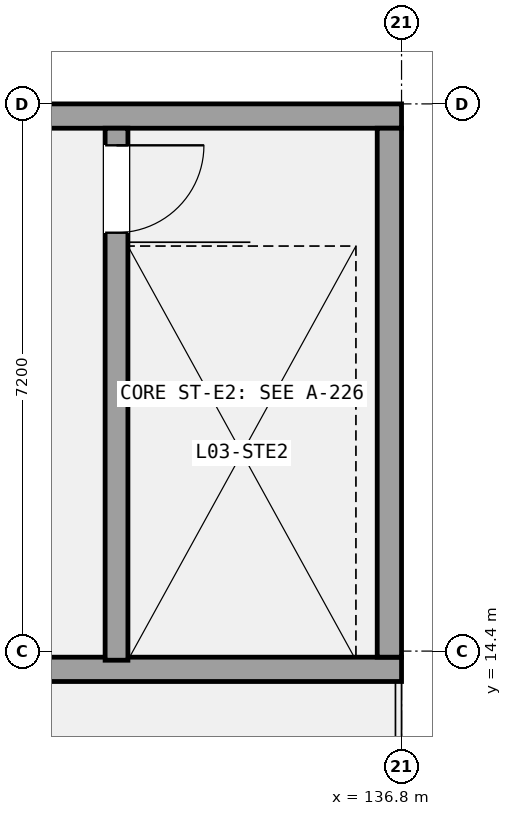
"""IFC4 building model, lengths in metres.
Left out: names, types, materials, properties, quantities, classifications, styles, units other than length and angle.
Written with IfcOpenShell. Run it as: python <this file> out.ifc"""

import sys

from ifc_helpers import new_model, si_unit, direction, frame, frame_2d, origin, place, context, subcontext, project, spatial, rectangle, extrude, element, fill, save


model = new_model("IFC4")
c1 = context("Model", 3, precision=1e-05, world=origin(), true_north=direction((0.0, 1.0)))
c2 = subcontext(c1, "Body", "Model", "MODEL_VIEW")
j1 = project(units=[si_unit("LENGTHUNIT", "METRE"), si_unit("PLANEANGLEUNIT", "RADIAN")], contexts=[c1])
p1 = place(None, origin())
s1 = spatial("IfcSite", under=j1, at=p1, CompositionType="ELEMENT")
p2 = place(p1, origin())
s2 = spatial("IfcBuilding", under=s1, at=p2, CompositionType="ELEMENT")
p3 = place(p2, frame((0.0, 0.0, 12.075)))
s3 = spatial("IfcBuildingStorey", under=s2, at=p3, CompositionType="ELEMENT", Elevation=12.075)
p4 = place(p3, frame((108.0, 14.16, 0.0), z_axis=(0.0, 0.0, 1.0), x_axis=(1.0, 0.0, 0.0)))
e1 = element("IfcWall", 1, at=p4, inside=s3, PredefinedType="SOLIDWALL", context=c2, shape_type="SweptSolid", body=[
    extrude(rectangle(XDim=28.8, YDim=0.32, at=frame_2d((14.4, 0.0))), origin(), (0.0, 0.0, 1.0), 3.15),
])
p5 = place(p4, frame((10.8, 0.0, 0.0)))
e2 = element("IfcOpeningElement", 2, at=p5, cuts=e1, PredefinedType="OPENING", context=c2, shape_type="SweptSolid", body=[
    extrude(rectangle(XDim=1.35, YDim=2.2, at=frame_2d((0.675, 1.1))), frame((0.0, 0.17, 0.0), z_axis=(0.0, -1.0, 0.0), x_axis=(1.0, 0.0, 0.0)), (0.0, 0.0, 1.0), 0.34),
])
p6 = place(p3, frame((108.0, 21.44, 0.0), z_axis=(0.0, 0.0, 1.0), x_axis=(1.0, 0.0, 0.0)))
e3 = element("IfcWall", 3, at=p6, inside=s3, PredefinedType="SOLIDWALL", context=c2, shape_type="SweptSolid", body=[
    extrude(rectangle(XDim=28.8, YDim=0.32, at=frame_2d((14.4, 0.0))), origin(), (0.0, 0.0, 1.0), 3.15),
])
p7 = place(p3, frame((136.64, 14.32, 0.0), z_axis=(0.0, 0.0, 1.0), x_axis=(0.0, 1.0, 0.0)))
e4 = element("IfcWall", 4, at=p7, inside=s3, PredefinedType="SOLIDWALL", context=c2, shape_type="SweptSolid", body=[
    extrude(rectangle(XDim=6.96, YDim=0.32, at=frame_2d((3.48, 0.0))), origin(), (0.0, 0.0, 1.0), 3.15),
])
p8 = place(p3, frame((133.05, 14.28, 0.0), z_axis=(0.0, 0.0, 1.0), x_axis=(0.0, 1.0, 0.0)))
e5 = element("IfcWall", 5, at=p8, inside=s3, PredefinedType="SHEAR", context=c2, shape_type="SweptSolid", body=[
    extrude(rectangle(XDim=7.0, YDim=0.3, at=frame_2d((3.5, 0.0))), origin(), (0.0, 0.0, 1.0), 3.15),
])
p9 = place(p8, frame((5.625, 0.0, 0.0)))
e6 = element("IfcOpeningElement", 6, at=p9, cuts=e5, PredefinedType="OPENING", context=c2, shape_type="SweptSolid", body=[
    extrude(rectangle(XDim=1.15, YDim=2.12, at=frame_2d((0.575, 1.06))), frame((0.0, 0.16, 0.0), z_axis=(0.0, -1.0, 0.0), x_axis=(1.0, 0.0, 0.0)), (0.0, 0.0, 1.0), 0.32),
])
p10 = place(p9, frame((1.15, 0.0, 0.0), z_axis=(0.0, 0.0, 1.0), x_axis=(-1.0, 0.0, 0.0)))
e7 = element("IfcDoor", 7, at=p10, inside=s3, OperationType="SINGLE_SWING_RIGHT", PredefinedType="DOOR", context=c2, shape_type="SweptSolid", body=[
    extrude(rectangle(XDim=1.15, YDim=2.12, at=frame_2d((0.575, 1.06))), frame((0.0, 0.025, 0.0), z_axis=(0.0, -1.0, 0.0), x_axis=(1.0, 0.0, 0.0)), (0.0, 0.0, 1.0), 0.05),
])
fill(e6, e7)
save(model, sys.argv[1])
